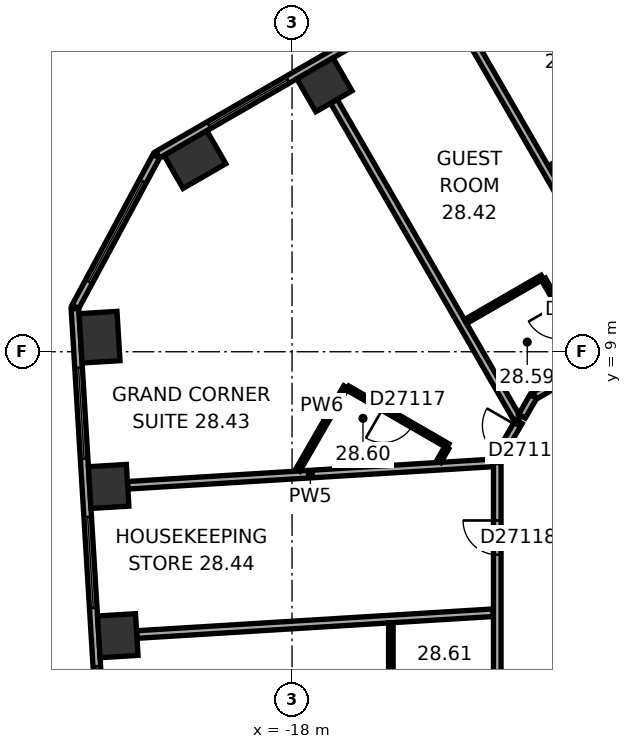
"""IFC4 building model, lengths in metres.
Left out: names, types, materials, properties, quantities, classifications, styles, units other than length and angle.
Written with IfcOpenShell. Run it as: python <this file> out.ifc"""

import sys

from ifc_helpers import new_model, si_unit, direction, frame, frame_2d, origin, origin_2d, place, context, subcontext, project, spatial, rectangle, extrude, element, fill, save


model = new_model("IFC4")
c1 = context("Model", 3, precision=1e-05, world=origin(), true_north=direction((0.0, 1.0)))
c2 = subcontext(c1, "Body", "Model", "MODEL_VIEW")
j1 = project(units=[si_unit("LENGTHUNIT", "METRE"), si_unit("PLANEANGLEUNIT", "RADIAN")], contexts=[c1])
p1 = place(None, origin())
s1 = spatial("IfcSite", under=j1, at=p1, CompositionType="ELEMENT")
p2 = place(p1, origin())
s2 = spatial("IfcBuilding", under=s1, at=p2, CompositionType="ELEMENT")
p3 = place(p2, frame((0.0, 0.0, 116.6)))
s3 = spatial("IfcBuildingStorey", under=s2, at=p3, CompositionType="ELEMENT", Elevation=116.6)
p4 = place(p3, frame((-17.148, 16.023, 0.0), z_axis=(0.0, 0.0, 1.0), x_axis=(-0.866025403784, -0.5, 0.0)))
e1 = element("IfcColumn", 1, at=p4, inside=s3, PredefinedType="COLUMN", context=c2, shape_type="SweptSolid", body=[
    extrude(rectangle(XDim=1.1, YDim=1.0, at=origin_2d()), origin(), (0.0, 0.0, 1.0), 3.3),
])
for number, where, z_axis, x_axis in (
    (2, (-20.555, 14.055, 0.0), (0.0, 0.0, 1.0), (-0.866, -0.5, 0.0)),
    (3, (-23.066, 9.383, 0.0), (0.0, 0.0, 1.0), (0.061, -0.998, 0.0)),
):
    element("IfcColumn", number, at=place(p3, frame(where, z_axis=z_axis, x_axis=x_axis)), inside=s3, PredefinedType="COLUMN", context=c2, shape_type="SweptSolid", body=[
        extrude(rectangle(XDim=1.3, YDim=1.0, at=origin_2d()), origin(), (0.0, 0.0, 1.0), 3.3),
    ])
for number, where, z_axis, x_axis in (
    (4, (-22.826, 5.456, 0.0), (0.0, 0.0, 1.0), (0.061, -0.998, 0.0)),
    (5, (-22.585, 1.529, 0.0), (0.0, 0.0, 1.0), (0.061, -0.998, 0.0)),
):
    element("IfcColumn", number, at=place(p3, frame(where, z_axis=z_axis, x_axis=x_axis)), inside=s3, PredefinedType="COLUMN", context=c2, shape_type="SweptSolid", body=[
        extrude(rectangle(XDim=1.1, YDim=1.0, at=origin_2d()), origin(), (0.0, 0.0, 1.0), 3.3),
    ])
p5 = place(p3, frame((-3.136, 24.805, 0.0), z_axis=(0.0, 0.0, 1.0), x_axis=(-0.866028291626, -0.499994998079, 0.0)))
e6 = element("IfcWall", 6, at=p5, inside=s3, PredefinedType="STANDARD", context=c2, shape_type="SweptSolid", body=[
    extrude(rectangle(XDim=21.246, YDim=0.2, at=frame_2d((10.623, 0.0))), origin(), (0.0, 0.0, 1.0), 3.3),
])
p6 = place(p5, frame((1.555, 0.0, 0.8)))
e7 = element("IfcOpeningElement", 7, at=p6, cuts=e6, PredefinedType="OPENING", context=c2, shape_type="SweptSolid", body=[
    extrude(rectangle(XDim=2.4, YDim=1.7, at=frame_2d((1.2, 0.85))), frame((0.0, 0.11, 0.0), z_axis=(0.0, -1.0, 0.0), x_axis=(1.0, 0.0, 0.0)), (0.0, 0.0, 1.0), 0.22),
])
p7 = place(p5, frame((5.489, 0.0, 0.8)))
e8 = element("IfcOpeningElement", 8, at=p7, cuts=e6, PredefinedType="OPENING", context=c2, shape_type="SweptSolid", body=[
    extrude(rectangle(XDim=2.4, YDim=1.7, at=frame_2d((1.2, 0.85))), frame((0.0, 0.11, 0.0), z_axis=(0.0, -1.0, 0.0), x_axis=(1.0, 0.0, 0.0)), (0.0, 0.0, 1.0), 0.22),
])
p8 = place(p5, frame((9.424, 0.0, 0.8)))
e9 = element("IfcOpeningElement", 9, at=p8, cuts=e6, PredefinedType="OPENING", context=c2, shape_type="SweptSolid", body=[
    extrude(rectangle(XDim=2.4, YDim=1.7, at=frame_2d((1.2, 0.85))), frame((0.0, 0.11, 0.0), z_axis=(0.0, -1.0, 0.0), x_axis=(1.0, 0.0, 0.0)), (0.0, 0.0, 1.0), 0.22),
])
p9 = place(p5, frame((13.358, 0.0, 0.8)))
e10 = element("IfcOpeningElement", 10, at=p9, cuts=e6, PredefinedType="OPENING", context=c2, shape_type="SweptSolid", body=[
    extrude(rectangle(XDim=2.4, YDim=1.7, at=frame_2d((1.2, 0.85))), frame((0.0, 0.11, 0.0), z_axis=(0.0, -1.0, 0.0), x_axis=(1.0, 0.0, 0.0)), (0.0, 0.0, 1.0), 0.22),
])
p10 = place(p5, frame((17.293, 0.0, 0.8)))
e11 = element("IfcOpeningElement", 11, at=p10, cuts=e6, PredefinedType="OPENING", context=c2, shape_type="SweptSolid", body=[
    extrude(rectangle(XDim=2.4, YDim=1.7, at=frame_2d((1.2, 0.85))), frame((0.0, 0.11, 0.0), z_axis=(0.0, -1.0, 0.0), x_axis=(1.0, 0.0, 0.0)), (0.0, 0.0, 1.0), 0.22),
])
p11 = place(p3, frame((-21.574, 14.143, 0.0), z_axis=(0.0, 0.0, 1.0), x_axis=(-0.473292949472, -0.880905093628, 0.0)))
e12 = element("IfcWall", 12, at=p11, inside=s3, PredefinedType="STANDARD", context=c2, shape_type="SweptSolid", body=[
    extrude(rectangle(XDim=4.494, YDim=0.2, at=frame_2d((2.247, 0.0))), origin(), (0.0, 0.0, 1.0), 3.3),
])
p12 = place(p11, frame((0.747, 0.0, 0.8)))
e13 = element("IfcOpeningElement", 13, at=p12, cuts=e12, PredefinedType="OPENING", context=c2, shape_type="SweptSolid", body=[
    extrude(rectangle(XDim=3.0, YDim=1.7, at=frame_2d((1.5, 0.85))), frame((0.0, 0.11, 0.0), z_axis=(0.0, -1.0, 0.0), x_axis=(1.0, 0.0, 0.0)), (0.0, 0.0, 1.0), 0.22),
])
p13 = place(p3, frame((-23.713, 10.131, 0.0), z_axis=(0.0, 0.0, 1.0), x_axis=(0.061040439785, -0.998135293791, 0.0)))
e14 = element("IfcWall", 14, at=p13, inside=s3, PredefinedType="STANDARD", context=c2, shape_type="SweptSolid", body=[
    extrude(rectangle(XDim=21.246, YDim=0.2, at=frame_2d((10.623, 0.0))), origin(), (0.0, 0.0, 1.0), 3.3),
])
p14 = place(p13, frame((1.553, 0.0, 0.8)))
e15 = element("IfcOpeningElement", 15, at=p14, cuts=e14, PredefinedType="OPENING", context=c2, shape_type="SweptSolid", body=[
    extrude(rectangle(XDim=2.4, YDim=1.7, at=frame_2d((1.2, 0.85))), frame((0.0, 0.11, 0.0), z_axis=(0.0, -1.0, 0.0), x_axis=(1.0, 0.0, 0.0)), (0.0, 0.0, 1.0), 0.22),
])
p15 = place(p13, frame((5.488, 0.0, 0.8)))
e16 = element("IfcOpeningElement", 16, at=p15, cuts=e14, PredefinedType="OPENING", context=c2, shape_type="SweptSolid", body=[
    extrude(rectangle(XDim=2.4, YDim=1.7, at=frame_2d((1.2, 0.85))), frame((0.0, 0.11, 0.0), z_axis=(0.0, -1.0, 0.0), x_axis=(1.0, 0.0, 0.0)), (0.0, 0.0, 1.0), 0.22),
])
p16 = place(p13, frame((9.422, 0.0, 0.8)))
e17 = element("IfcOpeningElement", 17, at=p16, cuts=e14, PredefinedType="OPENING", context=c2, shape_type="SweptSolid", body=[
    extrude(rectangle(XDim=2.4, YDim=1.7, at=frame_2d((1.2, 0.85))), frame((0.0, 0.11, 0.0), z_axis=(0.0, -1.0, 0.0), x_axis=(1.0, 0.0, 0.0)), (0.0, 0.0, 1.0), 0.22),
])
p17 = place(p13, frame((13.357, 0.0, 0.8)))
e18 = element("IfcOpeningElement", 18, at=p17, cuts=e14, PredefinedType="OPENING", context=c2, shape_type="SweptSolid", body=[
    extrude(rectangle(XDim=2.4, YDim=1.7, at=frame_2d((1.2, 0.85))), frame((0.0, 0.11, 0.0), z_axis=(0.0, -1.0, 0.0), x_axis=(1.0, 0.0, 0.0)), (0.0, 0.0, 1.0), 0.22),
])
p18 = place(p13, frame((17.292, 0.0, 0.8)))
e19 = element("IfcOpeningElement", 19, at=p18, cuts=e14, PredefinedType="OPENING", context=c2, shape_type="SweptSolid", body=[
    extrude(rectangle(XDim=2.4, YDim=1.7, at=frame_2d((1.2, 0.85))), frame((0.0, 0.11, 0.0), z_axis=(0.0, -1.0, 0.0), x_axis=(1.0, 0.0, 0.0)), (0.0, 0.0, 1.0), 0.22),
])
p19 = place(p3, frame((-22.327, 5.486, 0.0), z_axis=(0.0, 0.0, 1.0), x_axis=(0.998135194863, 0.061042057435, 0.0)))
e20 = element("IfcWall", 20, at=p19, inside=s3, PredefinedType="PARTITIONING", context=c2, shape_type="SweptSolid", body=[
    extrude(rectangle(XDim=9.635, YDim=0.2, at=frame_2d((4.817, 0.0))), origin(), (0.0, 0.0, 1.0), 2.95),
])
p20 = place(p3, frame((-22.086, 1.559, 0.0), z_axis=(0.0, 0.0, 1.0), x_axis=(0.99813491363, 0.061046655873, 0.0)))
e21 = element("IfcWall", 21, at=p20, inside=s3, PredefinedType="PARTITIONING", context=c2, shape_type="SweptSolid", body=[
    extrude(rectangle(XDim=9.394, YDim=0.2, at=frame_2d((4.697, 0.0))), origin(), (0.0, 0.0, 1.0), 2.15),
])
p21 = place(p3, frame((-17.849, 5.885, 0.0), z_axis=(0.0, 0.0, 1.0), x_axis=(0.500034589094, 0.866005432841, 0.0)))
e22 = element("IfcWall", 22, at=p21, inside=s3, PredefinedType="PARTITIONING", context=c2, shape_type="SweptSolid", body=[
    extrude(rectangle(XDim=2.528, YDim=0.12, at=frame_2d((1.264, 0.0))), origin(), (0.0, 0.0, 1.0), 2.95),
])
p22 = place(p3, frame((-16.898, 15.59, 0.0), z_axis=(0.0, 0.0, 1.0), x_axis=(0.499994742786, -0.866028439017, 0.0)))
e23 = element("IfcWall", 23, at=p22, inside=s3, PredefinedType="PARTITIONING", context=c2, shape_type="SweptSolid", body=[
    extrude(rectangle(XDim=9.65, YDim=0.2, at=frame_2d((4.825, 0.0))), origin(), (0.0, 0.0, 1.0), 2.95),
])
p23 = place(p3, frame((-16.533, 8.044, 0.0), z_axis=(0.0, 0.0, 1.0), x_axis=(0.86601037836, -0.500026023896, 0.0)))
e24 = element("IfcWall", 24, at=p23, inside=s3, PredefinedType="PARTITIONING", context=c2, shape_type="SweptSolid", body=[
    extrude(rectangle(XDim=3.04, YDim=0.12, at=frame_2d((1.52, 0.0))), origin(), (0.0, 0.0, 1.0), 2.95),
])
p24 = place(p23, frame((1.07, 0.0, 0.0)))
e25 = element("IfcOpeningElement", 25, at=p24, cuts=e24, PredefinedType="OPENING", context=c2, shape_type="SweptSolid", body=[
    extrude(rectangle(XDim=0.9, YDim=2.1, at=frame_2d((0.45, 1.05))), frame((0.0, 0.07, 0.0), z_axis=(0.0, -1.0, 0.0), x_axis=(1.0, 0.0, 0.0)), (0.0, 0.0, 1.0), 0.14),
])
p25 = place(p3, frame((-15.4, -0.461, 0.0), z_axis=(0.0, 0.0, 1.0), x_axis=(0.0, 1.0, 0.0)))
e26 = element("IfcWall", 26, at=p25, inside=s3, PredefinedType="PARTITIONING", context=c2, shape_type="SweptSolid", body=[
    extrude(rectangle(XDim=2.329, YDim=0.12, at=frame_2d((1.165, 0.0))), origin(), (0.0, 0.0, 1.0), 2.95),
])
p26 = place(p3, frame((-13.931, 6.472, 0.0), z_axis=(0.0, 0.0, 1.0), x_axis=(-0.499739399214, -0.866175809448, 0.0)))
e27 = element("IfcWall", 27, at=p26, inside=s3, PredefinedType="PARTITIONING", context=c2, shape_type="SweptSolid", body=[
    extrude(rectangle(XDim=0.416, YDim=0.12, at=frame_2d((0.208, 0.0))), origin(), (0.0, 0.0, 1.0), 2.95),
])
p27 = place(p3, frame((-13.436, 9.794, 0.0), z_axis=(0.0, 0.0, 1.0), x_axis=(0.866053246676, 0.499951771596, 0.0)))
e28 = element("IfcWall", 28, at=p27, inside=s3, PredefinedType="PARTITIONING", context=c2, shape_type="SweptSolid", body=[
    extrude(rectangle(XDim=2.335, YDim=0.12, at=frame_2d((1.167, 0.0))), origin(), (0.0, 0.0, 1.0), 2.95),
])
p28 = place(p3, frame((-12.6, 6.081, 0.0), z_axis=(0.0, 0.0, 1.0), x_axis=(0.0, -1.0, 0.0)))
e29 = element("IfcWall", 29, at=p28, inside=s3, PredefinedType="PARTITIONING", context=c2, shape_type="SweptSolid", body=[
    extrude(rectangle(XDim=12.219, YDim=0.2, at=frame_2d((6.109, 0.0))), origin(), (0.0, 0.0, 1.0), 2.95),
])
p29 = place(p28, frame((1.521, 0.0, 0.0)))
e30 = element("IfcOpeningElement", 30, at=p29, cuts=e29, PredefinedType="OPENING", context=c2, shape_type="SweptSolid", body=[
    extrude(rectangle(XDim=0.9, YDim=2.1, at=frame_2d((0.45, 1.05))), frame((0.0, 0.11, 0.0), z_axis=(0.0, -1.0, 0.0), x_axis=(1.0, 0.0, 0.0)), (0.0, 0.0, 1.0), 0.22),
])
p30 = place(p28, frame((8.759, 0.0, 0.0)))
e31 = element("IfcOpeningElement", 31, at=p30, cuts=e29, PredefinedType="OPENING", context=c2, shape_type="SweptSolid", body=[
    extrude(rectangle(XDim=0.9, YDim=2.1, at=frame_2d((0.45, 1.05))), frame((0.0, 0.11, 0.0), z_axis=(0.0, -1.0, 0.0), x_axis=(1.0, 0.0, 0.0)), (0.0, 0.0, 1.0), 0.22),
])
p31 = place(p3, frame((-12.032, 7.162, 0.0), z_axis=(0.0, 0.0, 1.0), x_axis=(-0.499951829968, -0.866053212979, 0.0)))
e32 = element("IfcWall", 32, at=p31, inside=s3, PredefinedType="PARTITIONING", context=c2, shape_type="SweptSolid", body=[
    extrude(rectangle(XDim=1.136, YDim=0.2, at=frame_2d((0.568, 0.0))), origin(), (0.0, 0.0, 1.0), 2.95),
])
p32 = place(p31, frame((0.118, 0.0, 0.0)))
e33 = element("IfcOpeningElement", 33, at=p32, cuts=e32, PredefinedType="OPENING", context=c2, shape_type="SweptSolid", body=[
    extrude(rectangle(XDim=0.9, YDim=2.1, at=frame_2d((0.45, 1.05))), frame((0.0, 0.11, 0.0), z_axis=(0.0, -1.0, 0.0), x_axis=(1.0, 0.0, 0.0)), (0.0, 0.0, 1.0), 0.22),
])
p33 = place(p3, frame((-11.65, 7.823, 0.0), z_axis=(0.0, 0.0, 1.0), x_axis=(-0.50012165622, -0.865955154139, 0.0)))
e34 = element("IfcWall", 34, at=p33, inside=s3, PredefinedType="PARTITIONING", context=c2, shape_type="SweptSolid", body=[
    extrude(rectangle(XDim=0.6, YDim=0.2, at=frame_2d((0.3, 0.0))), origin(), (0.0, 0.0, 1.0), 2.95),
])
p34 = place(p3, frame((-11.385, 10.909, 0.0), z_axis=(0.0, 0.0, 1.0), x_axis=(0.500077547548, -0.865980627057, 0.0)))
e35 = element("IfcWall", 35, at=p34, inside=s3, PredefinedType="PARTITIONING", context=c2, shape_type="SweptSolid", body=[
    extrude(rectangle(XDim=2.44, YDim=0.12, at=frame_2d((1.22, 0.0))), origin(), (0.0, 0.0, 1.0), 2.95),
])
p35 = place(p34, frame((0.77, 0.0, 0.0)))
e36 = element("IfcOpeningElement", 36, at=p35, cuts=e35, PredefinedType="OPENING", context=c2, shape_type="SweptSolid", body=[
    extrude(rectangle(XDim=0.9, YDim=2.1, at=frame_2d((0.45, 1.05))), frame((0.0, 0.07, 0.0), z_axis=(0.0, -1.0, 0.0), x_axis=(1.0, 0.0, 0.0)), (0.0, 0.0, 1.0), 0.14),
])
p36 = place(p3, frame((-9.497, 14.84, 0.0), z_axis=(0.0, 0.0, 1.0), x_axis=(-0.866041268327, -0.499972520799, 0.0)))
e37 = element("IfcWall", 37, at=p36, inside=s3, PredefinedType="PARTITIONING", context=c2, shape_type="SweptSolid", body=[
    extrude(rectangle(XDim=2.0, YDim=0.12, at=frame_2d((1.0, 0.0))), origin(), (0.0, 0.0, 1.0), 2.95),
])
p37 = place(p3, frame((-8.902, 9.41, 0.0), z_axis=(0.0, 0.0, 1.0), x_axis=(-0.866014299198, -0.500019233215, 0.0)))
e38 = element("IfcWall", 38, at=p37, inside=s3, PredefinedType="PARTITIONING", context=c2, shape_type="SweptSolid", body=[
    extrude(rectangle(XDim=3.133, YDim=0.2, at=frame_2d((1.567, 0.0))), origin(), (0.0, 0.0, 1.0), 2.95),
])
p38 = place(p37, frame((0.225, 0.0, 0.0)))
e39 = element("IfcOpeningElement", 39, at=p38, cuts=e38, PredefinedType="OPENING", context=c2, shape_type="SweptSolid", body=[
    extrude(rectangle(XDim=0.9, YDim=2.1, at=frame_2d((0.45, 1.05))), frame((0.0, 0.11, 0.0), z_axis=(0.0, -1.0, 0.0), x_axis=(1.0, 0.0, 0.0)), (0.0, 0.0, 1.0), 0.22),
])
p39 = place(p3, frame((-7.865, 7.814, 0.0), z_axis=(0.0, 0.0, 1.0), x_axis=(-0.500004234368, 0.866022959057, 0.0)))
e40 = element("IfcWall", 40, at=p39, inside=s3, PredefinedType="PARTITIONING", context=c2, shape_type="SweptSolid", body=[
    extrude(rectangle(XDim=11.25, YDim=0.2, at=frame_2d((5.625, 0.0))), origin(), (0.0, 0.0, 1.0), 2.95),
])
p40 = place(p39, frame((0.5, 0.0, 0.0)))
e41 = element("IfcOpeningElement", 41, at=p40, cuts=e40, PredefinedType="OPENING", context=c2, shape_type="SweptSolid", body=[
    extrude(rectangle(XDim=0.9, YDim=2.1, at=frame_2d((0.45, 1.05))), frame((0.0, 0.11, 0.0), z_axis=(0.0, -1.0, 0.0), x_axis=(1.0, 0.0, 0.0)), (0.0, 0.0, 1.0), 0.22),
])
p41 = place(p10, origin())
e42 = element("IfcWindow", 42, at=p41, inside=s3, PartitioningType="SINGLE_PANEL", PredefinedType="WINDOW", context=c2, shape_type="SweptSolid", body=[
    extrude(rectangle(XDim=2.4, YDim=1.7, at=frame_2d((1.2, 0.85))), frame((0.0, 0.03, 0.0), z_axis=(0.0, -1.0, 0.0), x_axis=(1.0, 0.0, 0.0)), (0.0, 0.0, 1.0), 0.06),
])
fill(e11, e42)
p42 = place(p12, origin())
e43 = element("IfcWindow", 43, at=p42, inside=s3, PartitioningType="SINGLE_PANEL", PredefinedType="WINDOW", context=c2, shape_type="SweptSolid", body=[
    extrude(rectangle(XDim=3.0, YDim=1.7, at=frame_2d((1.5, 0.85))), frame((0.0, 0.03, 0.0), z_axis=(0.0, -1.0, 0.0), x_axis=(1.0, 0.0, 0.0)), (0.0, 0.0, 1.0), 0.06),
])
fill(e13, e43)
p43 = place(p14, origin())
e44 = element("IfcWindow", 44, at=p43, inside=s3, PartitioningType="SINGLE_PANEL", PredefinedType="WINDOW", context=c2, shape_type="SweptSolid", body=[
    extrude(rectangle(XDim=2.4, YDim=1.7, at=frame_2d((1.2, 0.85))), frame((0.0, 0.03, 0.0), z_axis=(0.0, -1.0, 0.0), x_axis=(1.0, 0.0, 0.0)), (0.0, 0.0, 1.0), 0.06),
])
fill(e15, e44)
p44 = place(p15, origin())
e45 = element("IfcWindow", 45, at=p44, inside=s3, PartitioningType="SINGLE_PANEL", PredefinedType="WINDOW", context=c2, shape_type="SweptSolid", body=[
    extrude(rectangle(XDim=2.4, YDim=1.7, at=frame_2d((1.2, 0.85))), frame((0.0, 0.03, 0.0), z_axis=(0.0, -1.0, 0.0), x_axis=(1.0, 0.0, 0.0)), (0.0, 0.0, 1.0), 0.06),
])
fill(e16, e45)
p45 = place(p16, origin())
e46 = element("IfcWindow", 46, at=p45, inside=s3, PartitioningType="SINGLE_PANEL", PredefinedType="WINDOW", context=c2, shape_type="SweptSolid", body=[
    extrude(rectangle(XDim=2.4, YDim=1.7, at=frame_2d((1.2, 0.85))), frame((0.0, 0.03, 0.0), z_axis=(0.0, -1.0, 0.0), x_axis=(1.0, 0.0, 0.0)), (0.0, 0.0, 1.0), 0.06),
])
fill(e17, e46)
p46 = place(p32, origin())
e47 = element("IfcDoor", 47, at=p46, inside=s3, OperationType="SINGLE_SWING_LEFT", PredefinedType="DOOR", context=c2, shape_type="SweptSolid", body=[
    extrude(rectangle(XDim=0.9, YDim=2.1, at=frame_2d((0.45, 1.05))), frame((0.0, 0.025, 0.0), z_axis=(0.0, -1.0, 0.0), x_axis=(1.0, 0.0, 0.0)), (0.0, 0.0, 1.0), 0.05),
])
fill(e33, e47)
p47 = place(p24, origin())
e48 = element("IfcDoor", 48, at=p47, inside=s3, OperationType="SINGLE_SWING_LEFT", PredefinedType="DOOR", context=c2, shape_type="SweptSolid", body=[
    extrude(rectangle(XDim=0.9, YDim=2.1, at=frame_2d((0.45, 1.05))), frame((0.0, 0.025, 0.0), z_axis=(0.0, -1.0, 0.0), x_axis=(1.0, 0.0, 0.0)), (0.0, 0.0, 1.0), 0.05),
])
fill(e25, e48)
p48 = place(p29, origin())
e49 = element("IfcDoor", 49, at=p48, inside=s3, OperationType="SINGLE_SWING_LEFT", PredefinedType="DOOR", context=c2, shape_type="SweptSolid", body=[
    extrude(rectangle(XDim=0.9, YDim=2.1, at=frame_2d((0.45, 1.05))), frame((0.0, 0.025, 0.0), z_axis=(0.0, -1.0, 0.0), x_axis=(1.0, 0.0, 0.0)), (0.0, 0.0, 1.0), 0.05),
])
fill(e30, e49)
save(model, sys.argv[1])
